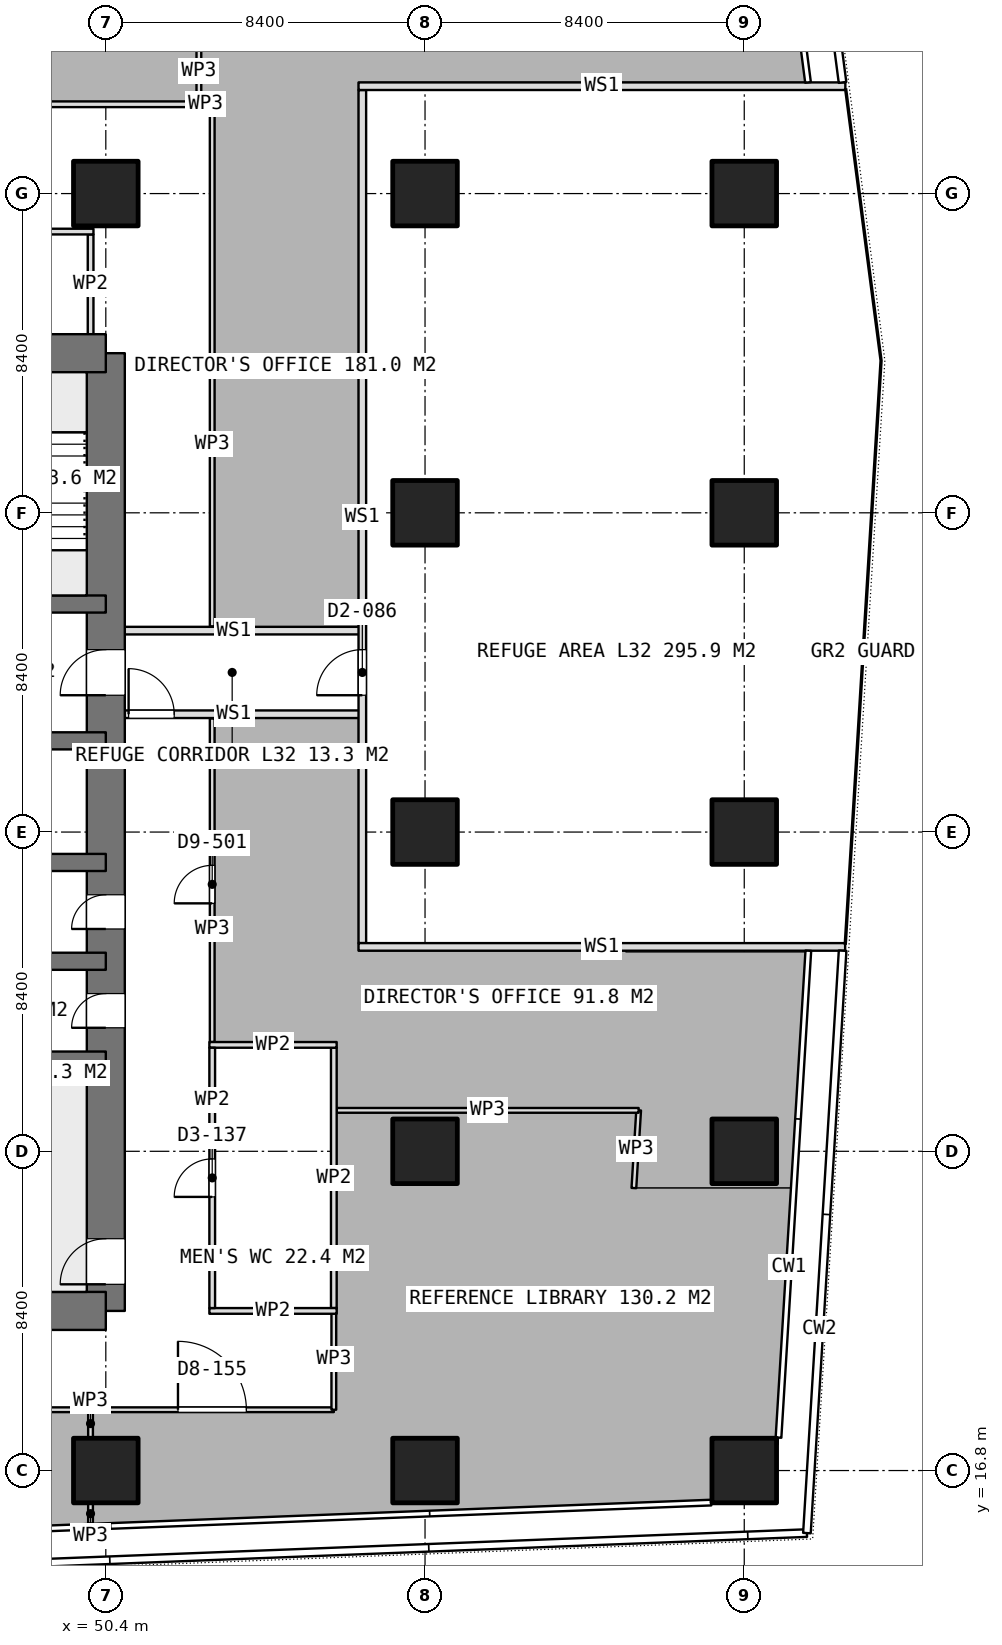
"""IFC4 building model, lengths in metres.
Left out: names, types, materials, properties, quantities, classifications, styles, units other than length and angle.
Written with IfcOpenShell. Run it as: python <this file> out.ifc"""

import sys

from ifc_helpers import new_model, si_unit, direction, frame, frame_2d, origin, origin_2d, place, context, subcontext, project, spatial, rectangle, extrude, element, fill, save


model = new_model("IFC4")
c1 = context("Model", 3, precision=1e-05, world=origin(), true_north=direction((0.0, 1.0)))
c2 = subcontext(c1, "Body", "Model", "MODEL_VIEW")
j1 = project(units=[si_unit("LENGTHUNIT", "METRE"), si_unit("PLANEANGLEUNIT", "RADIAN")], contexts=[c1])
p1 = place(None, origin())
s1 = spatial("IfcSite", under=j1, at=p1, CompositionType="ELEMENT")
p2 = place(p1, origin())
s2 = spatial("IfcBuilding", under=s1, at=p2, CompositionType="ELEMENT")
p3 = place(p2, frame((0.0, 0.0, 129.05)))
s3 = spatial("IfcBuildingStorey", under=s2, at=p3, CompositionType="ELEMENT", Elevation=129.05)
for number, where, z_axis, x_axis in (
    (1, (40.0, 21.0, 0.0), (0.0, 0.0, 1.0), (1.0, 0.0, 0.0)),
    (2, (40.0, 46.2, 0.0), (0.0, 0.0, 1.0), (1.0, 0.0, 0.0)),
):
    element("IfcWall", number, at=place(p3, frame(where, z_axis=z_axis, x_axis=x_axis)), inside=s3, PredefinedType="SHEAR", context=c2, shape_type="SweptSolid", body=[
        extrude(rectangle(XDim=10.4, YDim=1.0, at=frame_2d((5.2, 0.0))), origin(), (0.0, 0.0, 1.0), 3.75),
    ])
p4 = place(p3, frame((50.4, 21.0, 0.0), z_axis=(0.0, 0.0, 1.0), x_axis=(0.0, 1.0, 0.0)))
e3 = element("IfcWall", 3, at=p4, inside=s3, PredefinedType="SHEAR", context=c2, shape_type="SweptSolid", body=[
    extrude(rectangle(XDim=25.2, YDim=1.0, at=frame_2d((12.6, 0.0))), origin(), (0.0, 0.0, 1.0), 3.75),
])
p5 = place(p4, frame((16.2, 0.0, 0.0)))
e4 = element("IfcOpeningElement", 4, at=p5, cuts=e3, PredefinedType="OPENING", context=c2, shape_type="SweptSolid", body=[
    extrude(rectangle(XDim=1.2, YDim=2.1, at=frame_2d((0.6, 1.05))), frame((0.0, 0.51, 0.0), z_axis=(0.0, -1.0, 0.0), x_axis=(1.0, 0.0, 0.0)), (0.0, 0.0, 1.0), 1.02),
])
p6 = place(p4, frame((10.05, 0.0, 0.0)))
e5 = element("IfcOpeningElement", 5, at=p6, cuts=e3, PredefinedType="OPENING", context=c2, shape_type="SweptSolid", body=[
    extrude(rectangle(XDim=0.9, YDim=2.1, at=frame_2d((0.45, 1.05))), frame((0.0, 0.51, 0.0), z_axis=(0.0, -1.0, 0.0), x_axis=(1.0, 0.0, 0.0)), (0.0, 0.0, 1.0), 1.02),
])
p7 = place(p4, frame((7.45, 0.0, 0.0)))
e6 = element("IfcOpeningElement", 6, at=p7, cuts=e3, PredefinedType="OPENING", context=c2, shape_type="SweptSolid", body=[
    extrude(rectangle(XDim=0.9, YDim=2.1, at=frame_2d((0.45, 1.05))), frame((0.0, 0.51, 0.0), z_axis=(0.0, -1.0, 0.0), x_axis=(1.0, 0.0, 0.0)), (0.0, 0.0, 1.0), 1.02),
])
p8 = place(p4, frame((0.7, 0.0, 0.0)))
e7 = element("IfcOpeningElement", 7, at=p8, cuts=e3, PredefinedType="OPENING", context=c2, shape_type="SweptSolid", body=[
    extrude(rectangle(XDim=1.2, YDim=2.1, at=frame_2d((0.6, 1.05))), frame((0.0, 0.51, 0.0), z_axis=(0.0, -1.0, 0.0), x_axis=(1.0, 0.0, 0.0)), (0.0, 0.0, 1.0), 1.02),
])
for number, where, z_axis, x_axis in (
    (8, (43.8, 27.6, 0.0), (0.0, 0.0, 1.0), (1.0, 0.0, 0.0)),
    (9, (43.8, 30.2, 0.0), (0.0, 0.0, 1.0), (1.0, 0.0, 0.0)),
    (10, (43.8, 32.8, 0.0), (0.0, 0.0, 1.0), (1.0, 0.0, 0.0)),
):
    element("IfcWall", number, at=place(p3, frame(where, z_axis=z_axis, x_axis=x_axis)), inside=s3, PredefinedType="SHEAR", context=c2, shape_type="SweptSolid", body=[
        extrude(rectangle(XDim=6.6, YDim=0.45, at=frame_2d((3.3, 0.0))), origin(), (0.0, 0.0, 1.0), 3.75),
    ])
p9 = place(p3, frame((43.8, 36.0, 0.0), z_axis=(0.0, 0.0, 1.0), x_axis=(1.0, 0.0, 0.0)))
e11 = element("IfcWall", 11, at=p9, inside=s3, PredefinedType="SHEAR", context=c2, shape_type="SweptSolid", body=[
    extrude(rectangle(XDim=6.6, YDim=0.45, at=frame_2d((3.3, 0.0))), origin(), (0.0, 0.0, 1.0), 3.75),
])
p10 = place(p9, frame((2.65, 0.0, 0.0)))
e12 = element("IfcOpeningElement", 12, at=p10, cuts=e11, PredefinedType="OPENING", context=c2, shape_type="SweptSolid", body=[
    extrude(rectangle(XDim=1.3, YDim=2.1, at=frame_2d((0.65, 1.05))), frame((0.0, 0.235, 0.0), z_axis=(0.0, -1.0, 0.0), x_axis=(1.0, 0.0, 0.0)), (0.0, 0.0, 1.0), 0.47),
])
p11 = place(p3, frame((43.8, 39.6, 0.0), z_axis=(0.0, 0.0, 1.0), x_axis=(1.0, 0.0, 0.0)))
e13 = element("IfcWall", 13, at=p11, inside=s3, PredefinedType="SHEAR", context=c2, shape_type="SweptSolid", body=[
    extrude(rectangle(XDim=6.6, YDim=0.45, at=frame_2d((3.3, 0.0))), origin(), (0.0, 0.0, 1.0), 3.75),
])
p12 = place(p11, frame((0.425, 0.0, 0.0)))
e14 = element("IfcOpeningElement", 14, at=p12, cuts=e13, PredefinedType="OPENING", context=c2, shape_type="SweptSolid", body=[
    extrude(rectangle(XDim=1.2, YDim=2.1, at=frame_2d((0.6, 1.05))), frame((0.0, 0.235, 0.0), z_axis=(0.0, -1.0, 0.0), x_axis=(1.0, 0.0, 0.0)), (0.0, 0.0, 1.0), 0.47),
])
for number, where, z_axis, x_axis in (
    (15, (50.4, 16.8, 0.0), (0.0, 0.0, 1.0), (1.0, 0.0, 0.0)),
    (16, (50.4, 50.4, 0.0), (0.0, 0.0, 1.0), (1.0, 0.0, 0.0)),
    (17, (58.8, 16.8, 0.0), (0.0, 0.0, 1.0), (1.0, 0.0, 0.0)),
    (18, (58.8, 25.2, 0.0), (0.0, 0.0, 1.0), (1.0, 0.0, 0.0)),
    (19, (58.8, 33.6, 0.0), (0.0, 0.0, 1.0), (1.0, 0.0, 0.0)),
    (20, (58.8, 42.0, 0.0), (0.0, 0.0, 1.0), (1.0, 0.0, 0.0)),
    (21, (58.8, 50.4, 0.0), (0.0, 0.0, 1.0), (1.0, 0.0, 0.0)),
    (22, (67.2, 16.8, 0.0), (0.0, 0.0, 1.0), (1.0, 0.0, 0.0)),
    (23, (67.2, 25.2, 0.0), (0.0, 0.0, 1.0), (1.0, 0.0, 0.0)),
    (24, (67.2, 33.6, 0.0), (0.0, 0.0, 1.0), (1.0, 0.0, 0.0)),
    (25, (67.2, 42.0, 0.0), (0.0, 0.0, 1.0), (1.0, 0.0, 0.0)),
    (26, (67.2, 50.4, 0.0), (0.0, 0.0, 1.0), (1.0, 0.0, 0.0)),
):
    element("IfcColumn", number, at=place(p3, frame(where, z_axis=z_axis, x_axis=x_axis)), inside=s3, PredefinedType="COLUMN", context=c2, shape_type="SweptSolid", body=[
        extrude(rectangle(XDim=1.7, YDim=1.7, at=origin_2d()), origin(), (0.0, 0.0, 1.0), 3.75),
    ])
p13 = place(p3, frame((40.325, 49.4, 0.0), z_axis=(0.0, 0.0, 1.0), x_axis=(1.0, 0.0, 0.0)))
e27 = element("IfcWall", 27, at=p13, inside=s3, PredefinedType="PARTITIONING", context=c2, shape_type="SweptSolid", body=[
    extrude(rectangle(XDim=9.75, YDim=0.15, at=frame_2d((4.875, 0.0))), origin(), (0.0, 0.0, 1.0), 3.5),
])
p14 = place(p13, frame((4.375, 0.0, 0.0)))
e28 = element("IfcOpeningElement", 28, at=p14, cuts=e27, PredefinedType="OPENING", context=c2, shape_type="SweptSolid", body=[
    extrude(rectangle(XDim=1.0, YDim=2.1, at=frame_2d((0.5, 1.05))), frame((0.0, 0.085, 0.0), z_axis=(0.0, -1.0, 0.0), x_axis=(1.0, 0.0, 0.0)), (0.0, 0.0, 1.0), 0.17),
])
p15 = place(p3, frame((50.0, 46.7, 0.0), z_axis=(0.0, 0.0, 1.0), x_axis=(0.0, 1.0, 0.0)))
e29 = element("IfcWall", 29, at=p15, inside=s3, PredefinedType="PARTITIONING", context=c2, shape_type="SweptSolid", body=[
    extrude(rectangle(XDim=2.625, YDim=0.15, at=frame_2d((1.312, 0.0))), origin(), (0.0, 0.0, 1.0), 3.5),
])
for number, where, z_axis, x_axis in (
    (30, (53.125, 21.0, 0.0), (0.0, 0.0, 1.0), (1.0, 0.0, 0.0)),
    (31, (53.125, 28.0, 0.0), (0.0, 0.0, 1.0), (1.0, 0.0, 0.0)),
):
    element("IfcWall", number, at=place(p3, frame(where, z_axis=z_axis, x_axis=x_axis)), inside=s3, PredefinedType="PARTITIONING", context=c2, shape_type="SweptSolid", body=[
        extrude(rectangle(XDim=3.35, YDim=0.15, at=frame_2d((1.675, 0.0))), origin(), (0.0, 0.0, 1.0), 3.5),
    ])
p16 = place(p3, frame((53.2, 21.075, 0.0), z_axis=(0.0, 0.0, 1.0), x_axis=(0.0, 1.0, 0.0)))
e32 = element("IfcWall", 32, at=p16, inside=s3, PredefinedType="PARTITIONING", context=c2, shape_type="SweptSolid", body=[
    extrude(rectangle(XDim=6.85, YDim=0.15, at=frame_2d((3.425, 0.0))), origin(), (0.0, 0.0, 1.0), 3.5),
])
p17 = place(p16, frame((2.925, 0.0, 0.0)))
e33 = element("IfcOpeningElement", 33, at=p17, cuts=e32, PredefinedType="OPENING", context=c2, shape_type="SweptSolid", body=[
    extrude(rectangle(XDim=1.0, YDim=2.1, at=frame_2d((0.5, 1.05))), frame((0.0, 0.085, 0.0), z_axis=(0.0, -1.0, 0.0), x_axis=(1.0, 0.0, 0.0)), (0.0, 0.0, 1.0), 0.17),
])
p18 = place(p3, frame((56.4, 21.075, 0.0), z_axis=(0.0, 0.0, 1.0), x_axis=(0.0, 1.0, 0.0)))
e34 = element("IfcWall", 34, at=p18, inside=s3, PredefinedType="PARTITIONING", context=c2, shape_type="SweptSolid", body=[
    extrude(rectangle(XDim=6.85, YDim=0.15, at=frame_2d((3.425, 0.0))), origin(), (0.0, 0.0, 1.0), 3.5),
])
p19 = place(p3, frame((64.296, 24.233, 0.0), z_axis=(0.0, 0.0, 1.0), x_axis=(0.061034926911, 0.998135630912, 0.0)))
e35 = element("IfcWall", 35, at=p19, inside=s3, PredefinedType="PARTITIONING", context=c2, shape_type="SweptSolid", body=[
    extrude(rectangle(XDim=2.048, YDim=0.125, at=frame_2d((1.024, 0.0))), origin(), (0.0, 0.0, 1.0), 3.5),
])
p20 = place(p3, frame((64.421, 26.277, 0.0), z_axis=(0.0, 0.0, 1.0), x_axis=(-1.0, 0.0, 0.0)))
e36 = element("IfcWall", 36, at=p20, inside=s3, PredefinedType="PARTITIONING", context=c2, shape_type="SweptSolid", body=[
    extrude(rectangle(XDim=7.946, YDim=0.125, at=frame_2d((3.973, 0.0))), origin(), (0.0, 0.0, 1.0), 3.5),
])
p21 = place(p3, frame((53.2, 28.075, 0.0), z_axis=(0.0, 0.0, 1.0), x_axis=(0.0, 1.0, 0.0)))
e37 = element("IfcWall", 37, at=p21, inside=s3, PredefinedType="PARTITIONING", context=c2, shape_type="SweptSolid", body=[
    extrude(rectangle(XDim=8.514, YDim=0.125, at=frame_2d((4.257, 0.0))), origin(), (0.0, 0.0, 1.0), 3.5),
])
p22 = place(p21, frame((3.649, 0.0, 0.0)))
e38 = element("IfcOpeningElement", 38, at=p22, cuts=e37, PredefinedType="OPENING", context=c2, shape_type="SweptSolid", body=[
    extrude(rectangle(XDim=1.0, YDim=2.1, at=frame_2d((0.5, 1.05))), frame((0.0, 0.073, 0.0), z_axis=(0.0, -1.0, 0.0), x_axis=(1.0, 0.0, 0.0)), (0.0, 0.0, 1.0), 0.145),
])
p23 = place(p3, frame((53.2, 39.011, 0.0), z_axis=(0.0, 0.0, 1.0), x_axis=(0.0, 1.0, 0.0)))
e39 = element("IfcWall", 39, at=p23, inside=s3, PredefinedType="PARTITIONING", context=c2, shape_type="SweptSolid", body=[
    extrude(rectangle(XDim=13.739, YDim=0.125, at=frame_2d((6.87, 0.0))), origin(), (0.0, 0.0, 1.0), 3.5),
])
p24 = place(p3, frame((53.2, 52.75, 0.0), z_axis=(0.0, 0.0, 1.0), x_axis=(-1.0, 0.0, 0.0)))
e40 = element("IfcWall", 40, at=p24, inside=s3, PredefinedType="PARTITIONING", context=c2, shape_type="SweptSolid", body=[
    extrude(rectangle(XDim=0.351, YDim=0.125, at=frame_2d((0.175, 0.0))), origin(), (0.0, 0.0, 1.0), 3.5),
])
p25 = place(p3, frame((52.849, 52.75, 0.0), z_axis=(0.0, 0.0, 1.0), x_axis=(0.0, 1.0, 0.0)))
e41 = element("IfcWall", 41, at=p25, inside=s3, PredefinedType="PARTITIONING", context=c2, shape_type="SweptSolid", body=[
    extrude(rectangle(XDim=4.413, YDim=0.125, at=frame_2d((2.207, 0.0))), origin(), (0.0, 0.0, 1.0), 3.5),
])
p26 = place(p25, frame((1.706, 0.0, 0.0)))
e42 = element("IfcOpeningElement", 42, at=p26, cuts=e41, PredefinedType="OPENING", context=c2, shape_type="SweptSolid", body=[
    extrude(rectangle(XDim=1.0, YDim=2.1, at=frame_2d((0.5, 1.05))), frame((0.0, 0.073, 0.0), z_axis=(0.0, -1.0, 0.0), x_axis=(1.0, 0.0, 0.0)), (0.0, 0.0, 1.0), 0.145),
])
p27 = place(p3, frame((52.849, 52.75, 0.0), z_axis=(0.0, 0.0, 1.0), x_axis=(-1.0, 0.0, 0.0)))
e43 = element("IfcWall", 43, at=p27, inside=s3, PredefinedType="PARTITIONING", context=c2, shape_type="SweptSolid", body=[
    extrude(rectangle(XDim=17.223, YDim=0.15, at=frame_2d((8.612, 0.0))), origin(), (0.0, 0.0, 1.0), 3.5),
])
p28 = place(p27, frame((8.111, 0.0, 0.0)))
e44 = element("IfcOpeningElement", 44, at=p28, cuts=e43, PredefinedType="OPENING", context=c2, shape_type="SweptSolid", body=[
    extrude(rectangle(XDim=1.0, YDim=2.1, at=frame_2d((0.5, 1.05))), frame((0.0, 0.085, 0.0), z_axis=(0.0, -1.0, 0.0), x_axis=(1.0, 0.0, 0.0)), (0.0, 0.0, 1.0), 0.17),
])
p29 = place(p3, frame((40.401, 18.4, 0.0), z_axis=(0.0, 0.0, 1.0), x_axis=(1.0, 0.0, 0.0)))
e45 = element("IfcWall", 45, at=p29, inside=s3, PredefinedType="PARTITIONING", context=c2, shape_type="SweptSolid", body=[
    extrude(rectangle(XDim=9.597, YDim=0.125, at=frame_2d((4.799, 0.0))), origin(), (0.0, 0.0, 1.0), 3.5),
])
p30 = place(p29, frame((4.298, 0.0, 0.0)))
e46 = element("IfcOpeningElement", 46, at=p30, cuts=e45, PredefinedType="OPENING", context=c2, shape_type="SweptSolid", body=[
    extrude(rectangle(XDim=1.0, YDim=2.1, at=frame_2d((0.5, 1.05))), frame((0.0, 0.073, 0.0), z_axis=(0.0, -1.0, 0.0), x_axis=(1.0, 0.0, 0.0)), (0.0, 0.0, 1.0), 0.145),
])
p31 = place(p3, frame((49.998, 18.4, 0.0), z_axis=(0.0, 0.0, 1.0), x_axis=(0.0, -1.0, 0.0)))
e47 = element("IfcWall", 47, at=p31, inside=s3, PredefinedType="PARTITIONING", context=c2, shape_type="SweptSolid", body=[
    extrude(rectangle(XDim=0.73, YDim=0.125, at=frame_2d((0.365, 0.0))), origin(), (0.0, 0.0, 1.0), 3.5),
])
p32 = place(p3, frame((49.998, 15.93, 0.0), z_axis=(0.0, 0.0, 1.0), x_axis=(0.0, -1.0, 0.0)))
e48 = element("IfcWall", 48, at=p32, inside=s3, PredefinedType="PARTITIONING", context=c2, shape_type="SweptSolid", body=[
    extrude(rectangle(XDim=0.529, YDim=0.125, at=frame_2d((0.265, 0.0))), origin(), (0.0, 0.0, 1.0), 3.5),
])
p33 = place(p3, frame((49.998, 18.4, 0.0), z_axis=(0.0, 0.0, 1.0), x_axis=(1.0, 0.0, 0.0)))
e49 = element("IfcWall", 49, at=p33, inside=s3, PredefinedType="PARTITIONING", context=c2, shape_type="SweptSolid", body=[
    extrude(rectangle(XDim=6.402, YDim=0.125, at=frame_2d((3.201, 0.0))), origin(), (0.0, 0.0, 1.0), 3.5),
])
p34 = place(p33, frame((2.301, 0.0, 0.0)))
e50 = element("IfcOpeningElement", 50, at=p34, cuts=e49, PredefinedType="OPENING", context=c2, shape_type="SweptSolid", body=[
    extrude(rectangle(XDim=1.8, YDim=2.1, at=frame_2d((0.9, 1.05))), frame((0.0, 0.073, 0.0), z_axis=(0.0, -1.0, 0.0), x_axis=(1.0, 0.0, 0.0)), (0.0, 0.0, 1.0), 0.145),
])
p35 = place(p3, frame((56.4, 18.4, 0.0), z_axis=(0.0, 0.0, 1.0), x_axis=(0.0, 1.0, 0.0)))
e51 = element("IfcWall", 51, at=p35, inside=s3, PredefinedType="PARTITIONING", context=c2, shape_type="SweptSolid", body=[
    extrude(rectangle(XDim=2.675, YDim=0.125, at=frame_2d((1.337, 0.0))), origin(), (0.0, 0.0, 1.0), 3.5),
])
p36 = place(p3, frame((57.15, 30.678, 0.0), z_axis=(0.0, 0.0, 1.0), x_axis=(0.0, 1.0, 0.0)))
e52 = element("IfcWall", 52, at=p36, inside=s3, PredefinedType="PARTITIONING", context=c2, shape_type="SweptSolid", body=[
    extrude(rectangle(XDim=22.447, YDim=0.2, at=frame_2d((11.224, 0.0))), origin(), (0.0, 0.0, 1.0), 3.5),
])
p37 = place(p36, frame((6.522, 0.0, 0.0)))
e53 = element("IfcOpeningElement", 53, at=p37, cuts=e52, PredefinedType="OPENING", context=c2, shape_type="SweptSolid", body=[
    extrude(rectangle(XDim=1.2, YDim=2.1, at=frame_2d((0.6, 1.05))), frame((0.0, 0.11, 0.0), z_axis=(0.0, -1.0, 0.0), x_axis=(1.0, 0.0, 0.0)), (0.0, 0.0, 1.0), 0.22),
])
p38 = place(p3, frame((57.05, 30.578, 0.0), z_axis=(0.0, 0.0, 1.0), x_axis=(1.0, 0.0, 0.0)))
e54 = element("IfcWall", 54, at=p38, inside=s3, PredefinedType="PARTITIONING", context=c2, shape_type="SweptSolid", body=[
    extrude(rectangle(XDim=12.805, YDim=0.2, at=frame_2d((6.402, 0.0))), origin(), (0.0, 0.0, 1.0), 3.5),
])
p39 = place(p3, frame((57.05, 53.225, 0.0), z_axis=(0.0, 0.0, 1.0), x_axis=(1.0, 0.0, 0.0)))
e55 = element("IfcWall", 55, at=p39, inside=s3, PredefinedType="PARTITIONING", context=c2, shape_type="SweptSolid", body=[
    extrude(rectangle(XDim=12.81, YDim=0.2, at=frame_2d((6.405, 0.0))), origin(), (0.0, 0.0, 1.0), 3.5),
])
p40 = place(p3, frame((50.4, 38.9, 0.0), z_axis=(0.0, 0.0, 1.0), x_axis=(1.0, 0.0, 0.0)))
e56 = element("IfcWall", 56, at=p40, inside=s3, PredefinedType="PARTITIONING", context=c2, shape_type="SweptSolid", body=[
    extrude(rectangle(XDim=6.75, YDim=0.2, at=frame_2d((3.375, 0.0))), origin(), (0.0, 0.0, 1.0), 3.5),
])
p41 = place(p3, frame((50.4, 36.7, 0.0), z_axis=(0.0, 0.0, 1.0), x_axis=(1.0, 0.0, 0.0)))
e57 = element("IfcWall", 57, at=p41, inside=s3, PredefinedType="PARTITIONING", context=c2, shape_type="SweptSolid", body=[
    extrude(rectangle(XDim=6.75, YDim=0.2, at=frame_2d((3.375, 0.0))), origin(), (0.0, 0.0, 1.0), 3.5),
])
p42 = place(p41, frame((0.6, 0.0, 0.0)))
e58 = element("IfcOpeningElement", 58, at=p42, cuts=e57, PredefinedType="OPENING", context=c2, shape_type="SweptSolid", body=[
    extrude(rectangle(XDim=1.2, YDim=2.1, at=frame_2d((0.6, 1.05))), frame((0.0, 0.11, 0.0), z_axis=(0.0, -1.0, 0.0), x_axis=(1.0, 0.0, 0.0)), (0.0, 0.0, 1.0), 0.22),
])
p43 = place(p5, origin())
e59 = element("IfcDoor", 59, at=p43, inside=s3, OperationType="SINGLE_SWING_LEFT", PredefinedType="DOOR", context=c2, shape_type="SweptSolid", body=[
    extrude(rectangle(XDim=1.2, YDim=2.1, at=frame_2d((0.6, 1.05))), frame((0.0, 0.025, 0.0), z_axis=(0.0, -1.0, 0.0), x_axis=(1.0, 0.0, 0.0)), (0.0, 0.0, 1.0), 0.05),
])
fill(e4, e59)
p44 = place(p6, origin())
e60 = element("IfcDoor", 60, at=p44, inside=s3, OperationType="SINGLE_SWING_LEFT", PredefinedType="DOOR", context=c2, shape_type="SweptSolid", body=[
    extrude(rectangle(XDim=0.9, YDim=2.1, at=frame_2d((0.45, 1.05))), frame((0.0, 0.025, 0.0), z_axis=(0.0, -1.0, 0.0), x_axis=(1.0, 0.0, 0.0)), (0.0, 0.0, 1.0), 0.05),
])
fill(e5, e60)
p45 = place(p7, origin())
e61 = element("IfcDoor", 61, at=p45, inside=s3, OperationType="SINGLE_SWING_LEFT", PredefinedType="DOOR", context=c2, shape_type="SweptSolid", body=[
    extrude(rectangle(XDim=0.9, YDim=2.1, at=frame_2d((0.45, 1.05))), frame((0.0, 0.025, 0.0), z_axis=(0.0, -1.0, 0.0), x_axis=(1.0, 0.0, 0.0)), (0.0, 0.0, 1.0), 0.05),
])
fill(e6, e61)
p46 = place(p17, origin())
e62 = element("IfcDoor", 62, at=p46, inside=s3, OperationType="SINGLE_SWING_LEFT", PredefinedType="DOOR", context=c2, shape_type="SweptSolid", body=[
    extrude(rectangle(XDim=1.0, YDim=2.1, at=frame_2d((0.5, 1.05))), frame((0.0, 0.025, 0.0), z_axis=(0.0, -1.0, 0.0), x_axis=(1.0, 0.0, 0.0)), (0.0, 0.0, 1.0), 0.05),
])
fill(e33, e62)
p47 = place(p22, origin())
e63 = element("IfcDoor", 63, at=p47, inside=s3, OperationType="SINGLE_SWING_LEFT", PredefinedType="DOOR", context=c2, shape_type="SweptSolid", body=[
    extrude(rectangle(XDim=1.0, YDim=2.1, at=frame_2d((0.5, 1.05))), frame((0.0, 0.025, 0.0), z_axis=(0.0, -1.0, 0.0), x_axis=(1.0, 0.0, 0.0)), (0.0, 0.0, 1.0), 0.05),
])
fill(e38, e63)
p48 = place(p34, origin())
e64 = element("IfcDoor", 64, at=p48, inside=s3, OperationType="DOUBLE_DOOR_SINGLE_SWING", PredefinedType="DOOR", context=c2, shape_type="SweptSolid", body=[
    extrude(rectangle(XDim=1.8, YDim=2.1, at=frame_2d((0.9, 1.05))), frame((0.0, 0.025, 0.0), z_axis=(0.0, -1.0, 0.0), x_axis=(1.0, 0.0, 0.0)), (0.0, 0.0, 1.0), 0.05),
])
fill(e50, e64)
p49 = place(p8, origin())
e65 = element("IfcDoor", 65, at=p49, inside=s3, OperationType="SINGLE_SWING_RIGHT", PredefinedType="DOOR", context=c2, shape_type="SweptSolid", body=[
    extrude(rectangle(XDim=1.2, YDim=2.1, at=frame_2d((0.6, 1.05))), frame((0.0, 0.025, 0.0), z_axis=(0.0, -1.0, 0.0), x_axis=(1.0, 0.0, 0.0)), (0.0, 0.0, 1.0), 0.05),
])
fill(e7, e65)
p50 = place(p37, origin())
e66 = element("IfcDoor", 66, at=p50, inside=s3, OperationType="SINGLE_SWING_LEFT", PredefinedType="DOOR", context=c2, shape_type="SweptSolid", body=[
    extrude(rectangle(XDim=1.2, YDim=2.1, at=frame_2d((0.6, 1.05))), frame((0.0, 0.025, 0.0), z_axis=(0.0, -1.0, 0.0), x_axis=(1.0, 0.0, 0.0)), (0.0, 0.0, 1.0), 0.05),
])
fill(e53, e66)
p51 = place(p42, origin())
e67 = element("IfcDoor", 67, at=p51, inside=s3, OperationType="SINGLE_SWING_LEFT", PredefinedType="DOOR", context=c2, shape_type="SweptSolid", body=[
    extrude(rectangle(XDim=1.2, YDim=2.1, at=frame_2d((0.6, 1.05))), frame((0.0, 0.025, 0.0), z_axis=(0.0, -1.0, 0.0), x_axis=(1.0, 0.0, 0.0)), (0.0, 0.0, 1.0), 0.05),
])
fill(e58, e67)
save(model, sys.argv[1])
